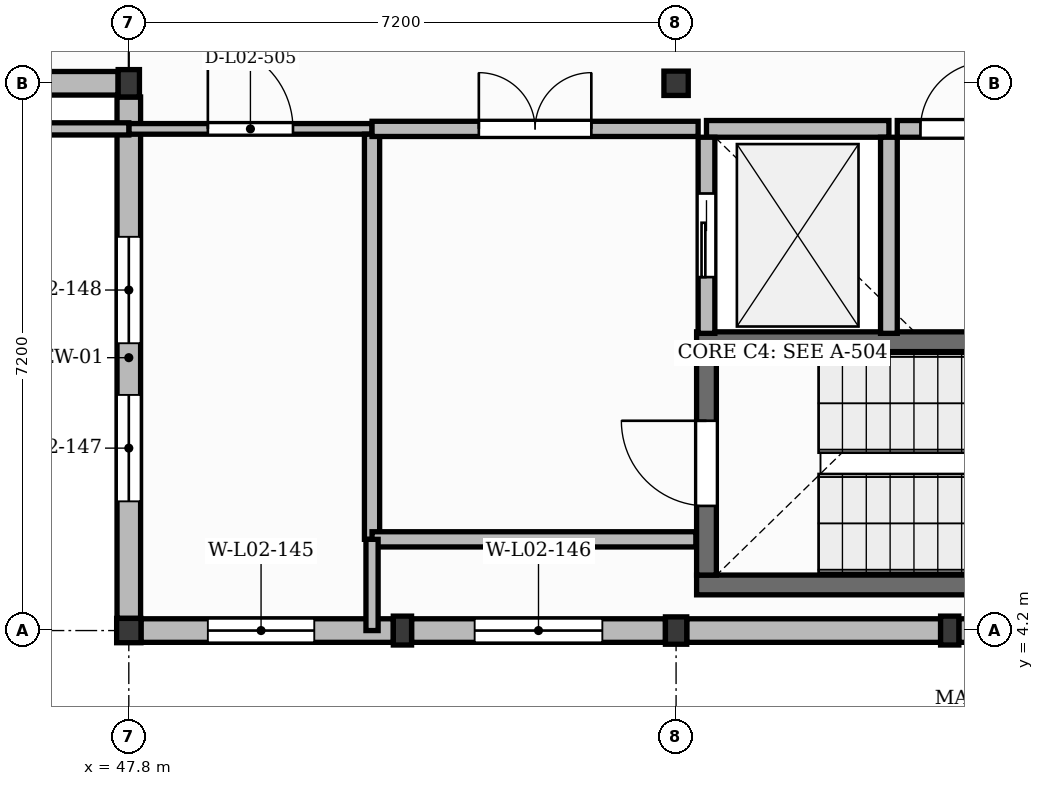
"""IFC4 building model, lengths in metres.
Left out: names, types, materials, properties, quantities, classifications, styles, units other than length and angle.
Written with IfcOpenShell. Run it as: python <this file> out.ifc"""

import sys

from ifc_helpers import new_model, si_unit, direction, frame, frame_2d, origin, origin_2d, place, context, subcontext, project, spatial, rectangle, extrude, element, fill, save


model = new_model("IFC4")
c1 = context("Model", 3, precision=1e-05, world=origin(), true_north=direction((0.0, 1.0)))
c2 = subcontext(c1, "Body", "Model", "MODEL_VIEW")
j1 = project(units=[si_unit("LENGTHUNIT", "METRE"), si_unit("PLANEANGLEUNIT", "RADIAN")], contexts=[c1])
p1 = place(None, origin())
s1 = spatial("IfcSite", under=j1, at=p1, CompositionType="ELEMENT")
p2 = place(p1, origin())
s2 = spatial("IfcBuilding", under=s1, at=p2, CompositionType="ELEMENT")
p3 = place(p2, frame((0.0, 0.0, 9.0)))
s3 = spatial("IfcBuildingStorey", under=s2, at=p3, CompositionType="ELEMENT", Elevation=9.0)
p4 = place(p3, frame((47.8, 4.2, 0.0), z_axis=(0.0, 0.0, 1.0), x_axis=(1.0, 0.0, 0.0)))
e1 = element("IfcColumn", 1, at=p4, inside=s3, PredefinedType="COLUMN", context=c2, shape_type="SweptSolid", body=[
    extrude(rectangle(XDim=0.32, YDim=0.32, at=origin_2d()), origin(), (0.0, 0.0, 1.0), 3.99),
])
p5 = place(p3, frame((47.8, 11.4, 0.0), z_axis=(0.0, 0.0, 1.0), x_axis=(1.0, 0.0, 0.0)))
e2 = element("IfcColumn", 2, at=p5, inside=s3, PredefinedType="COLUMN", context=c2, shape_type="SweptSolid", body=[
    extrude(rectangle(XDim=0.28, YDim=0.36, at=origin_2d()), origin(), (0.0, 0.0, 1.0), 3.98),
])
p6 = place(p3, frame((55.0, 4.2, 0.0), z_axis=(0.0, 0.0, 1.0), x_axis=(1.0, 0.0, 0.0)))
e3 = element("IfcColumn", 3, at=p6, inside=s3, PredefinedType="COLUMN", context=c2, shape_type="SweptSolid", body=[
    extrude(rectangle(XDim=0.28, YDim=0.36, at=origin_2d()), origin(), (0.0, 0.0, 1.0), 3.99),
])
p7 = place(p3, frame((55.0, 11.4, 0.0), z_axis=(0.0, 0.0, 1.0), x_axis=(1.0, 0.0, 0.0)))
e4 = element("IfcColumn", 4, at=p7, inside=s3, PredefinedType="COLUMN", context=c2, shape_type="SweptSolid", body=[
    extrude(rectangle(XDim=0.32, YDim=0.32, at=origin_2d()), origin(), (0.0, 0.0, 1.0), 3.99),
])
for number, where, z_axis, x_axis in (
    (5, (51.4, 4.2, 0.0), (0.0, 0.0, 1.0), (1.0, 0.0, 0.0)),
    (6, (58.6, 4.2, 0.0), (0.0, 0.0, 1.0), (1.0, 0.0, 0.0)),
):
    element("IfcColumn", number, at=place(p3, frame(where, z_axis=z_axis, x_axis=x_axis)), inside=s3, PredefinedType="PILASTER", context=c2, shape_type="SweptSolid", body=[
        extrude(rectangle(XDim=0.24, YDim=0.38, at=origin_2d()), origin(), (0.0, 0.0, 1.0), 3.99),
    ])
p8 = place(p3, frame((40.76, 11.4, 0.0), z_axis=(0.0, 0.0, 1.0), x_axis=(1.0, 0.0, 0.0)))
e7 = element("IfcWall", 7, at=p8, inside=s3, PredefinedType="SOLIDWALL", context=c2, shape_type="SweptSolid", body=[
    extrude(rectangle(XDim=6.9, YDim=0.31, at=frame_2d((3.45, 0.0))), origin(), (0.0, 0.0, 1.0), 3.49),
])
p9 = place(p8, frame((1.45, 0.0, 1.0)))
e8 = element("IfcOpeningElement", 8, at=p9, cuts=e7, PredefinedType="OPENING", context=c2, shape_type="SweptSolid", body=[
    extrude(rectangle(XDim=1.66, YDim=1.8, at=frame_2d((0.83, 0.9))), frame((0.0, 0.165, 0.0), z_axis=(0.0, -1.0, 0.0), x_axis=(1.0, 0.0, 0.0)), (0.0, 0.0, 1.0), 0.33),
])
p10 = place(p8, frame((3.79, 0.0, 1.0)))
e9 = element("IfcOpeningElement", 9, at=p10, cuts=e7, PredefinedType="OPENING", context=c2, shape_type="SweptSolid", body=[
    extrude(rectangle(XDim=1.66, YDim=1.8, at=frame_2d((0.83, 0.9))), frame((0.0, 0.165, 0.0), z_axis=(0.0, -1.0, 0.0), x_axis=(1.0, 0.0, 0.0)), (0.0, 0.0, 1.0), 0.33),
])
p11 = place(p3, frame((47.96, 4.2, 0.0), z_axis=(0.0, 0.0, 1.0), x_axis=(1.0, 0.0, 0.0)))
e10 = element("IfcWall", 10, at=p11, inside=s3, PredefinedType="SOLIDWALL", context=c2, shape_type="SweptSolid", body=[
    extrude(rectangle(XDim=3.32, YDim=0.31, at=frame_2d((1.66, 0.0))), origin(), (0.0, 0.0, 1.0), 3.53),
])
p12 = place(p11, frame((0.88, 0.0, 1.05)))
e11 = element("IfcOpeningElement", 11, at=p12, cuts=e10, PredefinedType="OPENING", context=c2, shape_type="SweptSolid", body=[
    extrude(rectangle(XDim=1.4, YDim=1.65, at=frame_2d((0.7, 0.825))), frame((0.0, 0.165, 0.0), z_axis=(0.0, -1.0, 0.0), x_axis=(1.0, 0.0, 0.0)), (0.0, 0.0, 1.0), 0.33),
])
p13 = place(p3, frame((51.52, 4.2, 0.0), z_axis=(0.0, 0.0, 1.0), x_axis=(1.0, 0.0, 0.0)))
e12 = element("IfcWall", 12, at=p13, inside=s3, PredefinedType="SOLIDWALL", context=c2, shape_type="SweptSolid", body=[
    extrude(rectangle(XDim=3.34, YDim=0.31, at=frame_2d((1.67, 0.0))), origin(), (0.0, 0.0, 1.0), 3.53),
])
p14 = place(p13, frame((0.83, 0.0, 1.5)))
e13 = element("IfcOpeningElement", 13, at=p14, cuts=e12, PredefinedType="OPENING", context=c2, shape_type="SweptSolid", body=[
    extrude(rectangle(XDim=1.68, YDim=1.25, at=frame_2d((0.84, 0.625))), frame((0.0, 0.165, 0.0), z_axis=(0.0, -1.0, 0.0), x_axis=(1.0, 0.0, 0.0)), (0.0, 0.0, 1.0), 0.33),
])
p15 = place(p3, frame((47.8, 4.36, 0.0), z_axis=(0.0, 0.0, 1.0), x_axis=(0.0, 1.0, 0.0)))
e14 = element("IfcWall", 14, at=p15, inside=s3, PredefinedType="SOLIDWALL", context=c2, shape_type="SweptSolid", body=[
    extrude(rectangle(XDim=6.86, YDim=0.31, at=frame_2d((3.43, 0.0))), origin(), (0.0, 0.0, 1.0), 3.52),
])
p16 = place(p15, frame((1.54, 0.0, 1.05)))
e15 = element("IfcOpeningElement", 15, at=p16, cuts=e14, PredefinedType="OPENING", context=c2, shape_type="SweptSolid", body=[
    extrude(rectangle(XDim=1.4, YDim=1.65, at=frame_2d((0.7, 0.825))), frame((0.0, 0.165, 0.0), z_axis=(0.0, -1.0, 0.0), x_axis=(1.0, 0.0, 0.0)), (0.0, 0.0, 1.0), 0.33),
])
p17 = place(p15, frame((3.62, 0.0, 1.05)))
e16 = element("IfcOpeningElement", 16, at=p17, cuts=e14, PredefinedType="OPENING", context=c2, shape_type="SweptSolid", body=[
    extrude(rectangle(XDim=1.4, YDim=1.65, at=frame_2d((0.7, 0.825))), frame((0.0, 0.165, 0.0), z_axis=(0.0, -1.0, 0.0), x_axis=(1.0, 0.0, 0.0)), (0.0, 0.0, 1.0), 0.33),
])
p18 = place(p3, frame((55.14, 4.2, 0.0), z_axis=(0.0, 0.0, 1.0), x_axis=(1.0, 0.0, 0.0)))
e17 = element("IfcWall", 17, at=p18, inside=s3, PredefinedType="SOLIDWALL", context=c2, shape_type="SweptSolid", body=[
    extrude(rectangle(XDim=3.34, YDim=0.31, at=frame_2d((1.67, 0.0))), origin(), (0.0, 0.0, 1.0), 3.53),
])
p19 = place(p3, frame((58.72, 4.2, 0.0), z_axis=(0.0, 0.0, 1.0), x_axis=(1.0, 0.0, 0.0)))
e18 = element("IfcWall", 18, at=p19, inside=s3, PredefinedType="SOLIDWALL", context=c2, shape_type="SweptSolid", body=[
    extrude(rectangle(XDim=3.32, YDim=0.31, at=frame_2d((1.66, 0.0))), origin(), (0.0, 0.0, 1.0), 3.53),
])
for number, where, z_axis, x_axis in (
    (19, (55.27, 4.8, 0.0), (0.0, 0.0, 1.0), (1.0, 0.0, 0.0)),
    (20, (55.27, 8.0, 0.0), (0.0, 0.0, 1.0), (1.0, 0.0, 0.0)),
):
    element("IfcWall", number, at=place(p3, frame(where, z_axis=z_axis, x_axis=x_axis)), inside=s3, PredefinedType="SHEAR", context=c2, shape_type="SweptSolid", body=[
        extrude(rectangle(XDim=6.66, YDim=0.26, at=frame_2d((3.33, 0.0))), origin(), (0.0, 0.0, 1.0), 3.95),
    ])
p20 = place(p3, frame((55.4, 4.93, 0.0), z_axis=(0.0, 0.0, 1.0), x_axis=(0.0, 1.0, 0.0)))
e21 = element("IfcWall", 21, at=p20, inside=s3, PredefinedType="SHEAR", context=c2, shape_type="SweptSolid", body=[
    extrude(rectangle(XDim=2.94, YDim=0.26, at=frame_2d((1.47, 0.0))), origin(), (0.0, 0.0, 1.0), 3.95),
])
p21 = place(p20, frame((0.91, 0.0, 0.0)))
e22 = element("IfcOpeningElement", 22, at=p21, cuts=e21, PredefinedType="OPENING", context=c2, shape_type="SweptSolid", body=[
    extrude(rectangle(XDim=1.12, YDim=2.1, at=frame_2d((0.56, 1.05))), frame((0.0, 0.14, 0.0), z_axis=(0.0, -1.0, 0.0), x_axis=(1.0, 0.0, 0.0)), (0.0, 0.0, 1.0), 0.28),
])
p22 = place(p3, frame((55.4, 10.8, 0.0), z_axis=(0.0, 0.0, 1.0), x_axis=(1.0, 0.0, 0.0)))
e23 = element("IfcWall", 23, at=p22, inside=s3, PredefinedType="SOLIDWALL", context=c2, shape_type="SweptSolid", body=[
    extrude(rectangle(XDim=2.4, YDim=0.22, at=frame_2d((1.2, 0.0))), origin(), (0.0, 0.0, 1.0), 3.95),
])
p23 = place(p3, frame((55.4, 8.11, 0.0), z_axis=(0.0, 0.0, 1.0), x_axis=(0.0, 1.0, 0.0)))
e24 = element("IfcWall", 24, at=p23, inside=s3, PredefinedType="SOLIDWALL", context=c2, shape_type="SweptSolid", body=[
    extrude(rectangle(XDim=2.58, YDim=0.22, at=frame_2d((1.29, 0.0))), origin(), (0.0, 0.0, 1.0), 3.95),
])
p24 = place(p23, frame((0.74, 0.0, 0.0)))
e25 = element("IfcOpeningElement", 25, at=p24, cuts=e24, PredefinedType="OPENING", context=c2, shape_type="SweptSolid", body=[
    extrude(rectangle(XDim=1.1, YDim=2.15, at=frame_2d((0.55, 1.075))), frame((0.0, 0.12, 0.0), z_axis=(0.0, -1.0, 0.0), x_axis=(1.0, 0.0, 0.0)), (0.0, 0.0, 1.0), 0.24),
])
p25 = place(p3, frame((57.8, 8.11, 0.0), z_axis=(0.0, 0.0, 1.0), x_axis=(0.0, 1.0, 0.0)))
e26 = element("IfcWall", 26, at=p25, inside=s3, PredefinedType="SOLIDWALL", context=c2, shape_type="SweptSolid", body=[
    extrude(rectangle(XDim=2.58, YDim=0.22, at=frame_2d((1.29, 0.0))), origin(), (0.0, 0.0, 1.0), 3.95),
])
p26 = place(p3, frame((47.8, 10.8, 0.0), z_axis=(0.0, 0.0, 1.0), x_axis=(1.0, 0.0, 0.0)))
e27 = element("IfcWall", 27, at=p26, inside=s3, PredefinedType="PARTITIONING", context=c2, shape_type="SweptSolid", body=[
    extrude(rectangle(XDim=3.2, YDim=0.14, at=frame_2d((1.6, 0.0))), origin(), (0.0, 0.0, 1.0), 3.96),
])
p27 = place(p26, frame((1.04, 0.0, 0.0)))
e28 = element("IfcOpeningElement", 28, at=p27, cuts=e27, PredefinedType="OPENING", context=c2, shape_type="SweptSolid", body=[
    extrude(rectangle(XDim=1.12, YDim=2.15, at=frame_2d((0.56, 1.075))), frame((0.0, 0.08, 0.0), z_axis=(0.0, -1.0, 0.0), x_axis=(1.0, 0.0, 0.0)), (0.0, 0.0, 1.0), 0.16),
])
p28 = place(p3, frame((51.0, 5.4, 0.0), z_axis=(0.0, 0.0, 1.0), x_axis=(0.0, 1.0, 0.0)))
e29 = element("IfcWall", 29, at=p28, inside=s3, PredefinedType="PARTITIONING", context=c2, shape_type="SweptSolid", body=[
    extrude(rectangle(XDim=5.33, YDim=0.2, at=frame_2d((2.665, 0.0))), origin(), (0.0, 0.0, 1.0), 3.96),
])
p29 = place(p3, frame((51.0, 10.8, 0.0), z_axis=(0.0, 0.0, 1.0), x_axis=(1.0, 0.0, 0.0)))
e30 = element("IfcWall", 30, at=p29, inside=s3, PredefinedType="PARTITIONING", context=c2, shape_type="SweptSolid", body=[
    extrude(rectangle(XDim=4.29, YDim=0.2, at=frame_2d((2.145, 0.0))), origin(), (0.0, 0.0, 1.0), 3.96),
])
p30 = place(p29, frame((1.405, 0.0, 0.0)))
e31 = element("IfcOpeningElement", 31, at=p30, cuts=e30, PredefinedType="OPENING", context=c2, shape_type="SweptSolid", body=[
    extrude(rectangle(XDim=1.48, YDim=2.25, at=frame_2d((0.74, 1.125))), frame((0.0, 0.11, 0.0), z_axis=(0.0, -1.0, 0.0), x_axis=(1.0, 0.0, 0.0)), (0.0, 0.0, 1.0), 0.22),
])
p31 = place(p3, frame((57.91, 10.8, 0.0), z_axis=(0.0, 0.0, 1.0), x_axis=(1.0, 0.0, 0.0)))
e32 = element("IfcWall", 32, at=p31, inside=s3, PredefinedType="SOLIDWALL", context=c2, shape_type="SweptSolid", body=[
    extrude(rectangle(XDim=1.49, YDim=0.22, at=frame_2d((0.745, 0.0))), origin(), (0.0, 0.0, 1.0), 3.96),
])
p32 = place(p31, frame((0.305, 0.0, 0.0)))
e33 = element("IfcOpeningElement", 33, at=p32, cuts=e32, PredefinedType="OPENING", context=c2, shape_type="SweptSolid", body=[
    extrude(rectangle(XDim=0.88, YDim=2.05, at=frame_2d((0.44, 1.025))), frame((0.0, 0.12, 0.0), z_axis=(0.0, -1.0, 0.0), x_axis=(1.0, 0.0, 0.0)), (0.0, 0.0, 1.0), 0.24),
])
p33 = place(p3, frame((51.0, 5.4, 0.0), z_axis=(0.0, 0.0, 1.0), x_axis=(1.0, 0.0, 0.0)))
e34 = element("IfcWall", 34, at=p33, inside=s3, PredefinedType="PARTITIONING", context=c2, shape_type="SweptSolid", body=[
    extrude(rectangle(XDim=4.26, YDim=0.2, at=frame_2d((2.13, 0.0))), origin(), (0.0, 0.0, 1.0), 3.96),
])
p34 = place(p3, frame((40.6, 10.8, 0.0), z_axis=(0.0, 0.0, 1.0), x_axis=(1.0, 0.0, 0.0)))
e35 = element("IfcWall", 35, at=p34, inside=s3, PredefinedType="PARTITIONING", context=c2, shape_type="SweptSolid", body=[
    extrude(rectangle(XDim=7.2, YDim=0.16, at=frame_2d((3.6, 0.0))), origin(), (0.0, 0.0, 1.0), 3.96),
])
p35 = place(p3, frame((51.0, 4.2, 0.0), z_axis=(0.0, 0.0, 1.0), x_axis=(0.0, 1.0, 0.0)))
e36 = element("IfcWall", 36, at=p35, inside=s3, PredefinedType="PARTITIONING", context=c2, shape_type="SweptSolid", body=[
    extrude(rectangle(XDim=1.2, YDim=0.16, at=frame_2d((0.6, 0.0))), origin(), (0.0, 0.0, 1.0), 3.96),
])
p36 = place(p12, origin())
e37 = element("IfcWindow", 37, at=p36, inside=s3, PartitioningType="SINGLE_PANEL", PredefinedType="WINDOW", context=c2, shape_type="SweptSolid", body=[
    extrude(rectangle(XDim=1.4, YDim=1.65, at=frame_2d((0.7, 0.825))), frame((0.0, 0.03, 0.0), z_axis=(0.0, -1.0, 0.0), x_axis=(1.0, 0.0, 0.0)), (0.0, 0.0, 1.0), 0.06),
])
fill(e11, e37)
p37 = place(p14, origin())
e38 = element("IfcWindow", 38, at=p37, inside=s3, PartitioningType="DOUBLE_PANEL_VERTICAL", PredefinedType="WINDOW", context=c2, shape_type="SweptSolid", body=[
    extrude(rectangle(XDim=1.68, YDim=1.25, at=frame_2d((0.84, 0.625))), frame((0.0, 0.03, 0.0), z_axis=(0.0, -1.0, 0.0), x_axis=(1.0, 0.0, 0.0)), (0.0, 0.0, 1.0), 0.06),
])
fill(e13, e38)
p38 = place(p16, origin())
e39 = element("IfcWindow", 39, at=p38, inside=s3, PartitioningType="SINGLE_PANEL", PredefinedType="WINDOW", context=c2, shape_type="SweptSolid", body=[
    extrude(rectangle(XDim=1.4, YDim=1.65, at=frame_2d((0.7, 0.825))), frame((0.0, 0.03, 0.0), z_axis=(0.0, -1.0, 0.0), x_axis=(1.0, 0.0, 0.0)), (0.0, 0.0, 1.0), 0.06),
])
fill(e15, e39)
p39 = place(p17, origin())
e40 = element("IfcWindow", 40, at=p39, inside=s3, PartitioningType="SINGLE_PANEL", PredefinedType="WINDOW", context=c2, shape_type="SweptSolid", body=[
    extrude(rectangle(XDim=1.4, YDim=1.65, at=frame_2d((0.7, 0.825))), frame((0.0, 0.03, 0.0), z_axis=(0.0, -1.0, 0.0), x_axis=(1.0, 0.0, 0.0)), (0.0, 0.0, 1.0), 0.06),
])
fill(e16, e40)
p40 = place(p24, origin())
e41 = element("IfcDoor", 41, at=p40, inside=s3, OperationType="SLIDING_TO_LEFT", PredefinedType="DOOR", context=c2, shape_type="SweptSolid", body=[
    extrude(rectangle(XDim=1.1, YDim=2.15, at=frame_2d((0.55, 1.075))), frame((0.0, 0.025, 0.0), z_axis=(0.0, -1.0, 0.0), x_axis=(1.0, 0.0, 0.0)), (0.0, 0.0, 1.0), 0.05),
])
fill(e25, e41)
p41 = place(p21, origin())
e42 = element("IfcDoor", 42, at=p41, inside=s3, OperationType="SINGLE_SWING_RIGHT", PredefinedType="DOOR", context=c2, shape_type="SweptSolid", body=[
    extrude(rectangle(XDim=1.12, YDim=2.1, at=frame_2d((0.56, 1.05))), frame((0.0, 0.025, 0.0), z_axis=(0.0, -1.0, 0.0), x_axis=(1.0, 0.0, 0.0)), (0.0, 0.0, 1.0), 0.05),
])
fill(e22, e42)
p42 = place(p30, origin())
e43 = element("IfcDoor", 43, at=p42, inside=s3, OperationType="DOUBLE_DOOR_SINGLE_SWING", PredefinedType="DOOR", context=c2, shape_type="SweptSolid", body=[
    extrude(rectangle(XDim=1.48, YDim=2.25, at=frame_2d((0.74, 1.125))), frame((0.0, 0.025, 0.0), z_axis=(0.0, -1.0, 0.0), x_axis=(1.0, 0.0, 0.0)), (0.0, 0.0, 1.0), 0.05),
])
fill(e31, e43)
p43 = place(p32, origin())
e44 = element("IfcDoor", 44, at=p43, inside=s3, OperationType="SINGLE_SWING_RIGHT", PredefinedType="DOOR", context=c2, shape_type="SweptSolid", body=[
    extrude(rectangle(XDim=0.88, YDim=2.05, at=frame_2d((0.44, 1.025))), frame((0.0, 0.025, 0.0), z_axis=(0.0, -1.0, 0.0), x_axis=(1.0, 0.0, 0.0)), (0.0, 0.0, 1.0), 0.05),
])
fill(e33, e44)
p44 = place(p27, origin())
e45 = element("IfcDoor", 45, at=p44, inside=s3, OperationType="SINGLE_SWING_LEFT", PredefinedType="DOOR", context=c2, shape_type="SweptSolid", body=[
    extrude(rectangle(XDim=1.12, YDim=2.15, at=frame_2d((0.56, 1.075))), frame((0.0, 0.025, 0.0), z_axis=(0.0, -1.0, 0.0), x_axis=(1.0, 0.0, 0.0)), (0.0, 0.0, 1.0), 0.05),
])
fill(e28, e45)
save(model, sys.argv[1])
